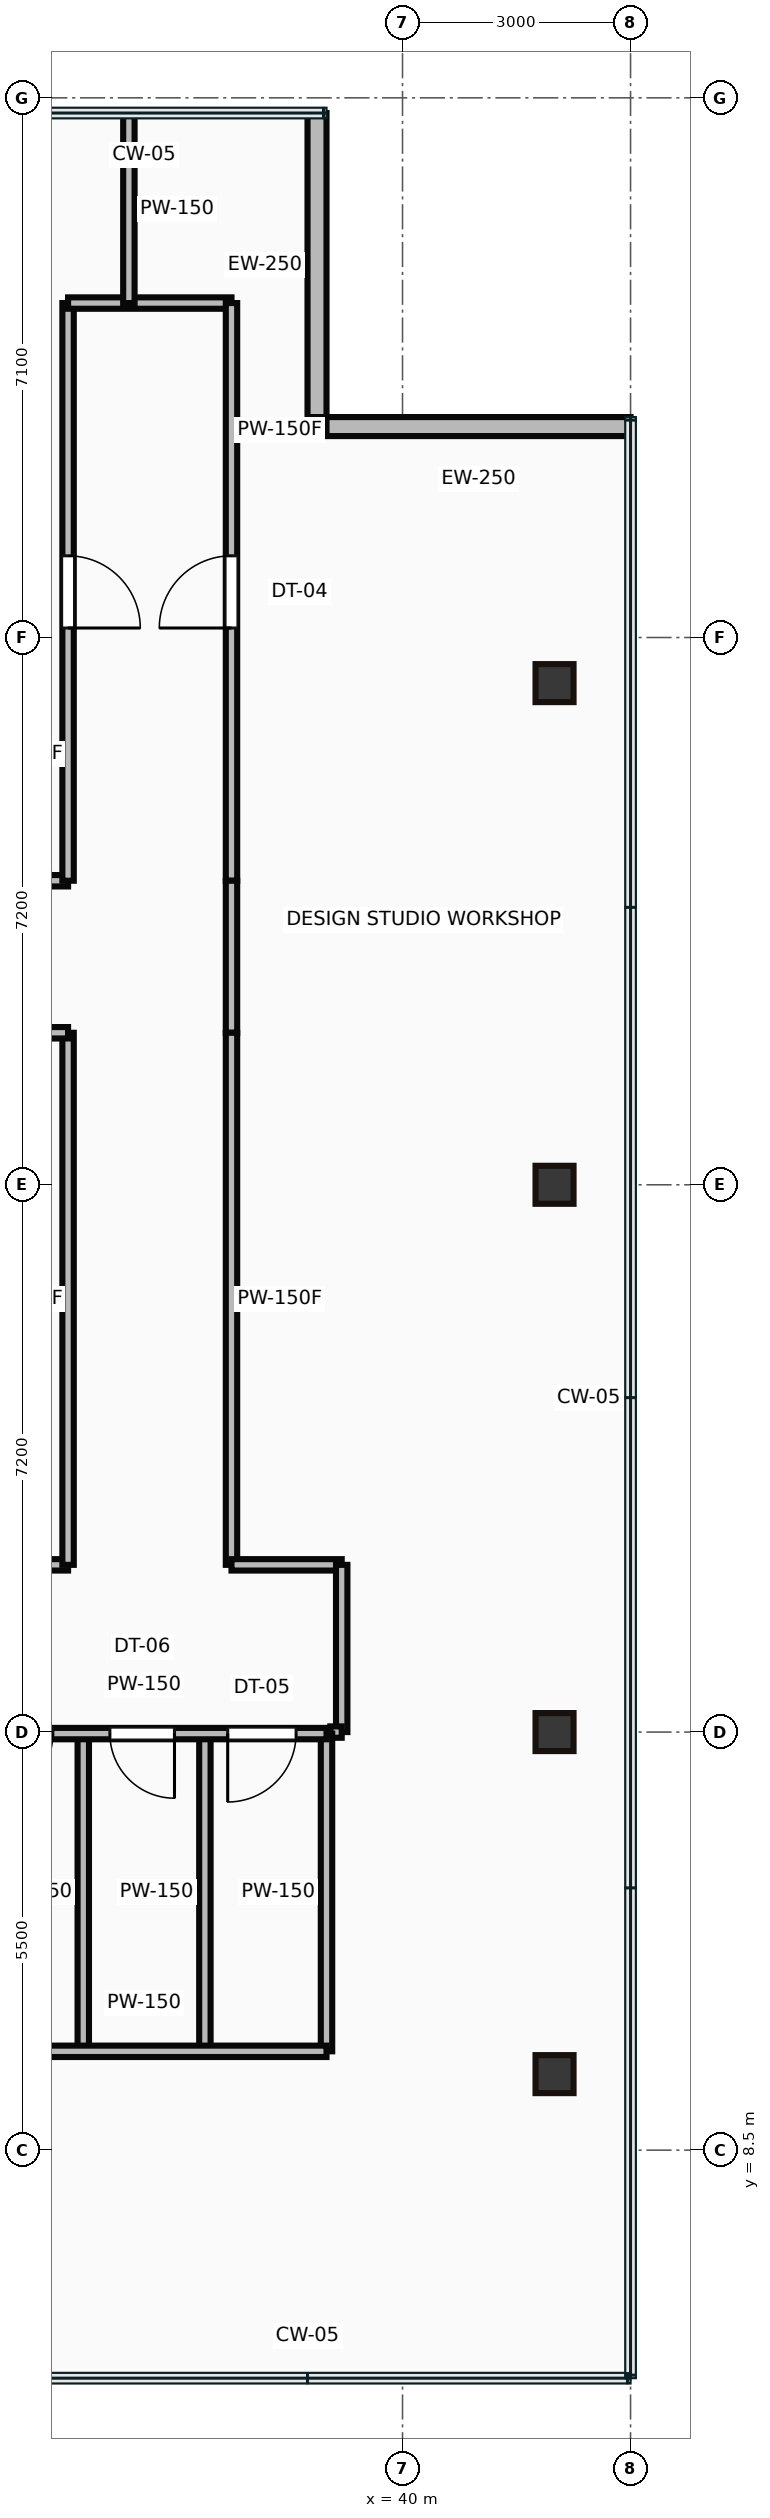
"""IFC4 building model, lengths in metres.
Left out: names, types, materials, properties, quantities, classifications, styles, units other than length and angle.
Written with IfcOpenShell. Run it as: python <this file> out.ifc"""

import sys

from ifc_helpers import new_model, si_unit, direction, frame, frame_2d, origin, origin_2d, place, context, subcontext, project, spatial, rectangle, hollow_rectangle, extrude, source, transform, mapped, element, fill, save


model = new_model("IFC4")
c1 = context("Model", 3, precision=1e-05, world=origin(), true_north=direction((0.0, 1.0)))
c2 = subcontext(c1, "Body", "Model", "MODEL_VIEW")
j1 = project(units=[si_unit("LENGTHUNIT", "METRE"), si_unit("PLANEANGLEUNIT", "RADIAN")], contexts=[c1])
p1 = place(None, origin())
s1 = spatial("IfcSite", under=j1, at=p1, CompositionType="ELEMENT")
p2 = place(p1, origin())
s2 = spatial("IfcBuilding", under=s1, at=p2, CompositionType="ELEMENT")
p3 = place(p2, frame((0.0, 0.0, 273.4)))
s3 = spatial("IfcBuildingStorey", under=s2, at=p3, CompositionType="ELEMENT", Elevation=273.4)
m1 = source(origin(), c2, "Body", "SweptSolid", [
    extrude(hollow_rectangle(XDim=0.5, YDim=0.5, WallThickness=0.022, at=origin_2d()), origin(), (0.0, 0.0, 1.0), 3.65),
])
for number, where, z_axis, x_axis in (
    (1, (42.0, 9.5, 0.0), (0.0, 0.0, 1.0), (1.0, 0.0, 0.0)),
    (2, (42.0, 14.0, 0.0), (0.0, 0.0, 1.0), (1.0, 0.0, 0.0)),
    (3, (42.0, 21.2, 0.0), (0.0, 0.0, 1.0), (1.0, 0.0, 0.0)),
    (4, (42.0, 27.8, 0.0), (0.0, 0.0, 1.0), (1.0, 0.0, 0.0)),
):
    element("IfcColumn", number, at=place(p3, frame(where, z_axis=z_axis, x_axis=x_axis)), inside=s3, PredefinedType="COLUMN", context=c2, shape_type="MappedRepresentation", body=[
        mapped(m1, transform((0.0, 0.0, 0.0))),
    ])
m2 = source(origin(), c2, "Body", "SweptSolid", [
    extrude(rectangle(XDim=4.0, YDim=0.25, at=frame_2d((2.0, 0.0))), origin(), (0.0, 0.0, 1.0), 3.4),
])
for number, where, z_axis, x_axis in (
    (5, (43.0, 31.175, 0.0), (0.0, 0.0, 1.0), (-1.0, 0.0, 0.0)),
    (6, (38.875, 31.3, 0.0), (0.0, 0.0, 1.0), (0.0, 1.0, 0.0)),
):
    element("IfcWall", number, at=place(p3, frame(where, z_axis=z_axis, x_axis=x_axis)), inside=s3, PredefinedType="STANDARD", context=c2, shape_type="MappedRepresentation", body=[
        mapped(m2, transform((0.0, 0.0, 0.0))),
    ])
m3 = source(origin(), c2, "Body", "SweptSolid", [
    extrude(rectangle(XDim=4.8, YDim=0.15, at=frame_2d((2.4, 0.0))), origin(), (0.0, 0.0, 1.0), 2.787),
])
p4 = place(p3, frame((34.2, 13.98, 0.0), z_axis=(0.0, 0.0, 1.0), x_axis=(1.0, 0.0, 0.0)))
e7 = element("IfcWall", 7, at=p4, inside=s3, PredefinedType="PARTITIONING", context=c2, shape_type="MappedRepresentation", body=[
    mapped(m3, transform((0.0, 0.0, 0.0))),
])
p5 = place(p4, frame((0.35, 0.0, 0.0)))
e8 = element("IfcOpeningElement", 8, at=p5, cuts=e7, PredefinedType="OPENING", context=c2, shape_type="SweptSolid", body=[
    extrude(rectangle(XDim=0.85, YDim=2.1, at=frame_2d((0.425, 1.05))), frame((0.0, 0.085, 0.0), z_axis=(0.0, -1.0, 0.0), x_axis=(1.0, 0.0, 0.0)), (0.0, 0.0, 1.0), 0.17),
])
p6 = place(p4, frame((1.95, 0.0, 0.0)))
e9 = element("IfcOpeningElement", 9, at=p6, cuts=e7, PredefinedType="OPENING", context=c2, shape_type="SweptSolid", body=[
    extrude(rectangle(XDim=0.85, YDim=2.1, at=frame_2d((0.425, 1.05))), frame((0.0, 0.085, 0.0), z_axis=(0.0, -1.0, 0.0), x_axis=(1.0, 0.0, 0.0)), (0.0, 0.0, 1.0), 0.17),
])
p7 = place(p4, frame((3.5, 0.0, 0.0)))
e10 = element("IfcOpeningElement", 10, at=p7, cuts=e7, PredefinedType="OPENING", context=c2, shape_type="SweptSolid", body=[
    extrude(rectangle(XDim=0.9, YDim=2.1, at=frame_2d((0.45, 1.05))), frame((0.0, 0.085, 0.0), z_axis=(0.0, -1.0, 0.0), x_axis=(1.0, 0.0, 0.0)), (0.0, 0.0, 1.0), 0.17),
])
m4 = source(origin(), c2, "Body", "SweptSolid", [
    extrude(rectangle(XDim=4.8, YDim=0.15, at=frame_2d((2.4, 0.0))), origin(), (0.0, 0.0, 1.0), 3.4),
])
p8 = place(p3, frame((34.2, 9.8, 0.0), z_axis=(0.0, 0.0, 1.0), x_axis=(1.0, 0.0, 0.0)))
e11 = element("IfcWall", 11, at=p8, inside=s3, PredefinedType="PARTITIONING", context=c2, shape_type="MappedRepresentation", body=[
    mapped(m4, transform((0.0, 0.0, 0.0))),
])
m5 = source(origin(), c2, "Body", "SweptSolid", [
    extrude(rectangle(XDim=4.18, YDim=0.15, at=frame_2d((2.09, 0.0))), origin(), (0.0, 0.0, 1.0), 3.4),
])
for number, where, z_axis, x_axis in (
    (12, (39.0, 9.8, 0.0), (0.0, 0.0, 1.0), (0.0, 1.0, 0.0)),
    (13, (35.8, 9.8, 0.0), (0.0, 0.0, 1.0), (0.0, 1.0, 0.0)),
    (14, (37.4, 9.8, 0.0), (0.0, 0.0, 1.0), (0.0, 1.0, 0.0)),
):
    element("IfcWall", number, at=place(p3, frame(where, z_axis=z_axis, x_axis=x_axis)), inside=s3, PredefinedType="PARTITIONING", context=c2, shape_type="MappedRepresentation", body=[
        mapped(m5, transform((0.0, 0.0, 0.0))),
    ])
m6 = source(origin(), c2, "Body", "SweptSolid", [
    extrude(rectangle(XDim=28.65, YDim=0.15, at=frame_2d((14.325, 0.0))), origin(), (0.0, 0.0, 1.0), 3.4),
])
p9 = place(p3, frame((6.95, 25.2, 0.0), z_axis=(0.0, 0.0, 1.0), x_axis=(1.0, 0.0, 0.0)))
e15 = element("IfcWall", 15, at=p9, inside=s3, PredefinedType="PARTITIONING", context=c2, shape_type="MappedRepresentation", body=[
    mapped(m6, transform((0.0, 0.0, 0.0))),
])
p10 = place(p9, frame((3.775, 0.0, 0.0)))
e16 = element("IfcOpeningElement", 16, at=p10, cuts=e15, PredefinedType="OPENING", context=c2, shape_type="SweptSolid", body=[
    extrude(rectangle(XDim=0.95, YDim=2.15, at=frame_2d((0.475, 1.075))), frame((0.0, 0.085, 0.0), z_axis=(0.0, -1.0, 0.0), x_axis=(1.0, 0.0, 0.0)), (0.0, 0.0, 1.0), 0.17),
])
p11 = place(p9, frame((11.175, 0.0, 0.0)))
e17 = element("IfcOpeningElement", 17, at=p11, cuts=e15, PredefinedType="OPENING", context=c2, shape_type="SweptSolid", body=[
    extrude(rectangle(XDim=0.95, YDim=2.15, at=frame_2d((0.475, 1.075))), frame((0.0, 0.085, 0.0), z_axis=(0.0, -1.0, 0.0), x_axis=(1.0, 0.0, 0.0)), (0.0, 0.0, 1.0), 0.17),
])
p12 = place(p9, frame((18.775, 0.0, 0.0)))
e18 = element("IfcOpeningElement", 18, at=p12, cuts=e15, PredefinedType="OPENING", context=c2, shape_type="SweptSolid", body=[
    extrude(rectangle(XDim=0.95, YDim=2.15, at=frame_2d((0.475, 1.075))), frame((0.0, 0.085, 0.0), z_axis=(0.0, -1.0, 0.0), x_axis=(1.0, 0.0, 0.0)), (0.0, 0.0, 1.0), 0.17),
])
m7 = source(origin(), c2, "Body", "SweptSolid", [
    extrude(rectangle(XDim=7.6, YDim=0.15, at=frame_2d((3.8, 0.0))), origin(), (0.0, 0.0, 1.0), 3.4),
])
p13 = place(p3, frame((35.6, 25.2, 0.0), z_axis=(0.0, 0.0, 1.0), x_axis=(0.0, 1.0, 0.0)))
e19 = element("IfcWall", 19, at=p13, inside=s3, PredefinedType="PARTITIONING", context=c2, shape_type="MappedRepresentation", body=[
    mapped(m7, transform((0.0, 0.0, 0.0))),
])
p14 = place(p13, frame((3.325, 0.0, 0.0)))
e20 = element("IfcOpeningElement", 20, at=p14, cuts=e19, PredefinedType="OPENING", context=c2, shape_type="SweptSolid", body=[
    extrude(rectangle(XDim=0.95, YDim=2.15, at=frame_2d((0.475, 1.075))), frame((0.0, 0.085, 0.0), z_axis=(0.0, -1.0, 0.0), x_axis=(1.0, 0.0, 0.0)), (0.0, 0.0, 1.0), 0.17),
])
m8 = source(origin(), c2, "Body", "SweptSolid", [
    extrude(rectangle(XDim=2.15, YDim=0.15, at=frame_2d((1.075, 0.0))), origin(), (0.0, 0.0, 1.0), 3.4),
])
p15 = place(p3, frame((35.6, 32.8, 0.0), z_axis=(0.0, 0.0, 1.0), x_axis=(1.0, 0.0, 0.0)))
e21 = element("IfcWall", 21, at=p15, inside=s3, PredefinedType="PARTITIONING", context=c2, shape_type="MappedRepresentation", body=[
    mapped(m8, transform((0.0, 0.0, 0.0))),
])
p16 = place(p3, frame((37.75, 32.8, 0.0), z_axis=(0.0, 0.0, 1.0), x_axis=(0.0, -1.0, 0.0)))
e22 = element("IfcWall", 22, at=p16, inside=s3, PredefinedType="PARTITIONING", context=c2, shape_type="MappedRepresentation", body=[
    mapped(m7, transform((0.0, 0.0, 0.0))),
])
p17 = place(p16, frame((3.325, 0.0, 0.0)))
e23 = element("IfcOpeningElement", 23, at=p17, cuts=e22, PredefinedType="OPENING", context=c2, shape_type="SweptSolid", body=[
    extrude(rectangle(XDim=0.95, YDim=2.15, at=frame_2d((0.475, 1.075))), frame((0.0, 0.085, 0.0), z_axis=(0.0, -1.0, 0.0), x_axis=(1.0, 0.0, 0.0)), (0.0, 0.0, 1.0), 0.17),
])
m9 = source(origin(), c2, "Body", "SweptSolid", [
    extrude(rectangle(XDim=2.0, YDim=0.15, at=frame_2d((1.0, 0.0))), origin(), (0.0, 0.0, 1.0), 3.4),
])
p18 = place(p3, frame((37.75, 25.2, 0.0), z_axis=(0.0, 0.0, 1.0), x_axis=(0.0, -1.0, 0.0)))
e24 = element("IfcWall", 24, at=p18, inside=s3, PredefinedType="PARTITIONING", context=c2, shape_type="MappedRepresentation", body=[
    mapped(m9, transform((0.0, 0.0, 0.0))),
])
m10 = source(origin(), c2, "Body", "SweptSolid", [
    extrude(rectangle(XDim=7.0, YDim=0.15, at=frame_2d((3.5, 0.0))), origin(), (0.0, 0.0, 1.0), 3.4),
])
p19 = place(p3, frame((37.75, 23.2, 0.0), z_axis=(0.0, 0.0, 1.0), x_axis=(0.0, -1.0, 0.0)))
e25 = element("IfcWall", 25, at=p19, inside=s3, PredefinedType="PARTITIONING", context=c2, shape_type="MappedRepresentation", body=[
    mapped(m10, transform((0.0, 0.0, 0.0))),
])
m11 = source(origin(), c2, "Body", "SweptSolid", [
    extrude(rectangle(XDim=1.45, YDim=0.15, at=frame_2d((0.725, 0.0))), origin(), (0.0, 0.0, 1.0), 3.4),
])
p20 = place(p3, frame((37.75, 16.2, 0.0), z_axis=(0.0, 0.0, 1.0), x_axis=(1.0, 0.0, 0.0)))
e26 = element("IfcWall", 26, at=p20, inside=s3, PredefinedType="PARTITIONING", context=c2, shape_type="MappedRepresentation", body=[
    mapped(m11, transform((0.0, 0.0, 0.0))),
])
m12 = source(origin(), c2, "Body", "SweptSolid", [
    extrude(rectangle(XDim=2.2, YDim=0.15, at=frame_2d((1.1, 0.0))), origin(), (0.0, 0.0, 1.0), 3.4),
])
p21 = place(p3, frame((39.2, 16.2, 0.0), z_axis=(0.0, 0.0, 1.0), x_axis=(0.0, -1.0, 0.0)))
e27 = element("IfcWall", 27, at=p21, inside=s3, PredefinedType="PARTITIONING", context=c2, shape_type="MappedRepresentation", body=[
    mapped(m12, transform((0.0, 0.0, 0.0))),
])
m13 = source(origin(), c2, "Body", "SweptSolid", [
    extrude(rectangle(XDim=0.15, YDim=0.15, at=frame_2d((0.075, 0.0))), origin(), (0.0, 0.0, 1.0), 3.4),
])
p22 = place(p3, frame((39.2, 14.0, 0.0), z_axis=(0.0, 0.0, 1.0), x_axis=(-1.0, 0.0, 0.0)))
e28 = element("IfcWall", 28, at=p22, inside=s3, PredefinedType="PARTITIONING", context=c2, shape_type="MappedRepresentation", body=[
    mapped(m13, transform((0.0, 0.0, 0.0))),
])
p23 = place(p3, frame((6.95, 16.2, 0.0), z_axis=(0.0, 0.0, 1.0), x_axis=(1.0, 0.0, 0.0)))
e29 = element("IfcWall", 29, at=p23, inside=s3, PredefinedType="PARTITIONING", context=c2, shape_type="MappedRepresentation", body=[
    mapped(m6, transform((0.0, 0.0, 0.0))),
])
p24 = place(p23, frame((21.445, 0.0, 0.0)))
e30 = element("IfcOpeningElement", 30, at=p24, cuts=e29, PredefinedType="OPENING", context=c2, shape_type="SweptSolid", body=[
    extrude(rectangle(XDim=0.95, YDim=2.15, at=frame_2d((0.475, 1.075))), frame((0.0, 0.085, 0.0), z_axis=(0.0, -1.0, 0.0), x_axis=(1.0, 0.0, 0.0)), (0.0, 0.0, 1.0), 0.17),
])
p25 = place(p3, frame((35.6, 16.2, 0.0), z_axis=(0.0, 0.0, 1.0), x_axis=(0.0, 1.0, 0.0)))
e31 = element("IfcWall", 31, at=p25, inside=s3, PredefinedType="PARTITIONING", context=c2, shape_type="MappedRepresentation", body=[
    mapped(m10, transform((0.0, 0.0, 0.0))),
])
p26 = place(p3, frame((35.6, 23.2, 0.0), z_axis=(0.0, 0.0, 1.0), x_axis=(-1.0, 0.0, 0.0)))
e32 = element("IfcWall", 32, at=p26, inside=s3, PredefinedType="PARTITIONING", context=c2, shape_type="MappedRepresentation", body=[
    mapped(m6, transform((0.0, 0.0, 0.0))),
])
p27 = place(p26, frame((24.12, 0.0, 0.0)))
e33 = element("IfcOpeningElement", 33, at=p27, cuts=e32, PredefinedType="OPENING", context=c2, shape_type="SweptSolid", body=[
    extrude(rectangle(XDim=0.95, YDim=2.15, at=frame_2d((0.475, 1.075))), frame((0.0, 0.085, 0.0), z_axis=(0.0, -1.0, 0.0), x_axis=(1.0, 0.0, 0.0)), (0.0, 0.0, 1.0), 0.17),
])
p28 = place(p26, frame((16.525, 0.0, 0.0)))
e34 = element("IfcOpeningElement", 34, at=p28, cuts=e32, PredefinedType="OPENING", context=c2, shape_type="SweptSolid", body=[
    extrude(rectangle(XDim=0.95, YDim=2.15, at=frame_2d((0.475, 1.075))), frame((0.0, 0.085, 0.0), z_axis=(0.0, -1.0, 0.0), x_axis=(1.0, 0.0, 0.0)), (0.0, 0.0, 1.0), 0.17),
])
m14 = source(origin(), c2, "Body", "SweptSolid", [
    extrude(rectangle(XDim=2.48, YDim=0.15, at=frame_2d((1.24, 0.0))), origin(), (0.0, 0.0, 1.0), 3.4),
])
p29 = place(p3, frame((36.4, 35.28, 0.0), z_axis=(0.0, 0.0, 1.0), x_axis=(0.0, -1.0, 0.0)))
e35 = element("IfcWall", 35, at=p29, inside=s3, PredefinedType="PARTITIONING", context=c2, shape_type="MappedRepresentation", body=[
    mapped(m14, transform((0.0, 0.0, 0.0))),
])
m15 = source(origin(), c2, "Body", "SweptSolid", [
    extrude(rectangle(XDim=0.85, YDim=2.1, at=frame_2d((0.425, 1.05))), frame((0.0, 0.025, 0.0), z_axis=(0.0, -1.0, 0.0), x_axis=(1.0, 0.0, 0.0)), (0.0, 0.0, 1.0), 0.05),
])
p30 = place(p5, frame((0.85, 0.0, 0.0), z_axis=(0.0, 0.0, 1.0), x_axis=(-1.0, 0.0, 0.0)))
e36 = element("IfcDoor", 36, at=p30, inside=s3, OperationType="SINGLE_SWING_LEFT", PredefinedType="DOOR", context=c2, shape_type="MappedRepresentation", body=[
    mapped(m15, transform((0.0, 0.0, 0.0))),
])
fill(e8, e36)
p31 = place(p6, frame((0.85, 0.0, 0.0), z_axis=(0.0, 0.0, 1.0), x_axis=(-1.0, 0.0, 0.0)))
e37 = element("IfcDoor", 37, at=p31, inside=s3, OperationType="SINGLE_SWING_RIGHT", PredefinedType="DOOR", context=c2, shape_type="MappedRepresentation", body=[
    mapped(m15, transform((0.0, 0.0, 0.0))),
])
fill(e9, e37)
m16 = source(origin(), c2, "Body", "SweptSolid", [
    extrude(rectangle(XDim=0.9, YDim=2.1, at=frame_2d((0.45, 1.05))), frame((0.0, 0.025, 0.0), z_axis=(0.0, -1.0, 0.0), x_axis=(1.0, 0.0, 0.0)), (0.0, 0.0, 1.0), 0.05),
])
p32 = place(p7, frame((0.9, 0.0, 0.0), z_axis=(0.0, 0.0, 1.0), x_axis=(-1.0, 0.0, 0.0)))
e38 = element("IfcDoor", 38, at=p32, inside=s3, OperationType="SINGLE_SWING_LEFT", PredefinedType="DOOR", context=c2, shape_type="MappedRepresentation", body=[
    mapped(m16, transform((0.0, 0.0, 0.0))),
])
fill(e10, e38)
m17 = source(origin(), c2, "Body", "SweptSolid", [
    extrude(rectangle(XDim=0.95, YDim=2.15, at=frame_2d((0.475, 1.075))), frame((0.0, 0.025, 0.0), z_axis=(0.0, -1.0, 0.0), x_axis=(1.0, 0.0, 0.0)), (0.0, 0.0, 1.0), 0.05),
])
p33 = place(p14, origin())
e39 = element("IfcDoor", 39, at=p33, inside=s3, OperationType="SINGLE_SWING_LEFT", PredefinedType="DOOR", context=c2, shape_type="MappedRepresentation", body=[
    mapped(m17, transform((0.0, 0.0, 0.0))),
])
fill(e20, e39)
p34 = place(p17, origin())
e40 = element("IfcDoor", 40, at=p34, inside=s3, OperationType="SINGLE_SWING_RIGHT", PredefinedType="DOOR", context=c2, shape_type="MappedRepresentation", body=[
    mapped(m17, transform((0.0, 0.0, 0.0))),
])
fill(e23, e40)
save(model, sys.argv[1])
